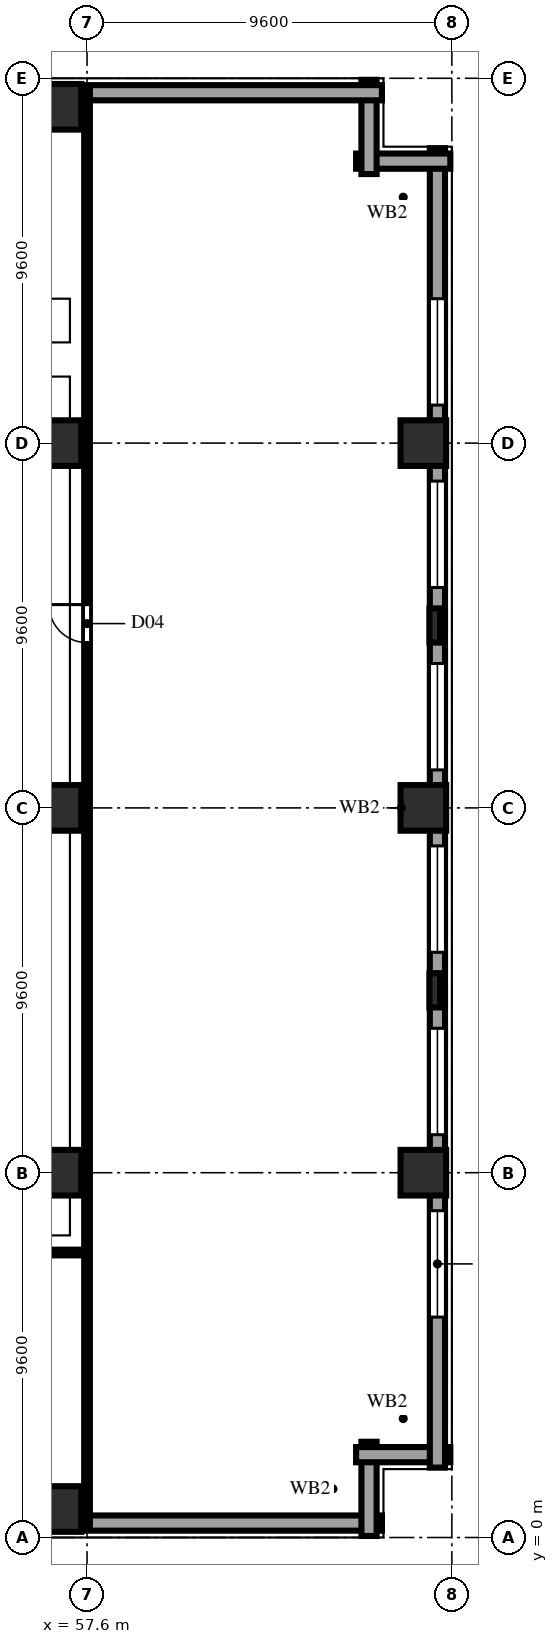
"""IFC4 building model, lengths in metres.
Left out: names, types, materials, properties, quantities, classifications, styles, units other than length and angle.
Written with IfcOpenShell. Run it as: python <this file> out.ifc"""

import sys

from ifc_helpers import new_model, si_unit, direction, frame, frame_2d, origin, origin_2d, place, context, subcontext, project, spatial, rectangle, extrude, element, fill, save


model = new_model("IFC4")
c1 = context("Model", 3, precision=1e-05, world=origin(), true_north=direction((0.0, 1.0)))
c2 = subcontext(c1, "Body", "Model", "MODEL_VIEW")
j1 = project(units=[si_unit("LENGTHUNIT", "METRE"), si_unit("PLANEANGLEUNIT", "RADIAN")], contexts=[c1])
p1 = place(None, origin())
s1 = spatial("IfcSite", under=j1, at=p1, CompositionType="ELEMENT")
p2 = place(p1, origin())
s2 = spatial("IfcBuilding", under=s1, at=p2, CompositionType="ELEMENT")
p3 = place(p2, frame((0.0, 0.0, 15.0)))
s3 = spatial("IfcBuildingStorey", under=s2, at=p3, CompositionType="ELEMENT", Elevation=15.0)
for number, where, z_axis, x_axis in (
    (1, (56.85, 0.75, 0.0), (0.0, 0.0, 1.0), (1.0, 0.0, 0.0)),
    (2, (56.85, 9.6, 0.0), (0.0, 0.0, 1.0), (1.0, 0.0, 0.0)),
    (3, (56.85, 19.2, 0.0), (0.0, 0.0, 1.0), (1.0, 0.0, 0.0)),
    (4, (56.85, 28.8, 0.0), (0.0, 0.0, 1.0), (1.0, 0.0, 0.0)),
    (5, (56.85, 37.65, 0.0), (0.0, 0.0, 1.0), (1.0, 0.0, 0.0)),
    (6, (66.45, 9.6, 0.0), (0.0, 0.0, 1.0), (1.0, 0.0, 0.0)),
    (7, (66.45, 19.2, 0.0), (0.0, 0.0, 1.0), (1.0, 0.0, 0.0)),
    (8, (66.45, 28.8, 0.0), (0.0, 0.0, 1.0), (1.0, 0.0, 0.0)),
):
    element("IfcColumn", number, at=place(p3, frame(where, z_axis=z_axis, x_axis=x_axis)), inside=s3, PredefinedType="COLUMN", context=c2, shape_type="SweptSolid", body=[
        extrude(rectangle(XDim=1.2, YDim=1.2, at=origin_2d()), origin(), (0.0, 0.0, 1.0), 4.6),
    ])
for number, where, z_axis, x_axis in (
    (9, (66.75, 14.4, 0.0), (0.0, 0.0, 1.0), (0.0, 1.0, 0.0)),
    (10, (66.75, 24.0, 0.0), (0.0, 0.0, 1.0), (0.0, 1.0, 0.0)),
):
    element("IfcColumn", number, at=place(p3, frame(where, z_axis=z_axis, x_axis=x_axis)), inside=s3, PredefinedType="PILASTER", context=c2, shape_type="SweptSolid", body=[
        extrude(rectangle(XDim=0.9, YDim=0.28, at=origin_2d()), origin(), (0.0, 0.0, 1.0), 4.6),
    ])
p4 = place(p3, frame((1.84, 0.38, 0.0), z_axis=(0.0, 0.0, 1.0), x_axis=(1.0, 0.0, 0.0)))
e11 = element("IfcWall", 11, at=p4, inside=s3, PredefinedType="SOLIDWALL", context=c2, shape_type="SweptSolid", body=[
    extrude(rectangle(XDim=63.52, YDim=0.4, at=frame_2d((31.76, 0.0))), origin(), (0.0, 0.0, 1.0), 4.26),
])
p5 = place(p4, frame((3.96, 0.0, 0.75)))
e12 = element("IfcOpeningElement", 12, at=p5, cuts=e11, PredefinedType="OPENING", context=c2, shape_type="SweptSolid", body=[
    extrude(rectangle(XDim=2.8, YDim=2.3, at=frame_2d((1.4, 1.15))), frame((0.0, 0.212, 0.0), z_axis=(0.0, -1.0, 0.0), x_axis=(1.0, 0.0, 0.0)), (0.0, 0.0, 1.0), 0.424),
])
p6 = place(p4, frame((8.76, 0.0, 0.75)))
e13 = element("IfcOpeningElement", 13, at=p6, cuts=e11, PredefinedType="OPENING", context=c2, shape_type="SweptSolid", body=[
    extrude(rectangle(XDim=2.8, YDim=2.3, at=frame_2d((1.4, 1.15))), frame((0.0, 0.212, 0.0), z_axis=(0.0, -1.0, 0.0), x_axis=(1.0, 0.0, 0.0)), (0.0, 0.0, 1.0), 0.424),
])
p7 = place(p4, frame((13.56, 0.0, 0.75)))
e14 = element("IfcOpeningElement", 14, at=p7, cuts=e11, PredefinedType="OPENING", context=c2, shape_type="SweptSolid", body=[
    extrude(rectangle(XDim=2.8, YDim=2.3, at=frame_2d((1.4, 1.15))), frame((0.0, 0.212, 0.0), z_axis=(0.0, -1.0, 0.0), x_axis=(1.0, 0.0, 0.0)), (0.0, 0.0, 1.0), 0.424),
])
p8 = place(p4, frame((18.36, 0.0, 0.75)))
e15 = element("IfcOpeningElement", 15, at=p8, cuts=e11, PredefinedType="OPENING", context=c2, shape_type="SweptSolid", body=[
    extrude(rectangle(XDim=2.8, YDim=2.3, at=frame_2d((1.4, 1.15))), frame((0.0, 0.212, 0.0), z_axis=(0.0, -1.0, 0.0), x_axis=(1.0, 0.0, 0.0)), (0.0, 0.0, 1.0), 0.424),
])
p9 = place(p4, frame((23.16, 0.0, 0.75)))
e16 = element("IfcOpeningElement", 16, at=p9, cuts=e11, PredefinedType="OPENING", context=c2, shape_type="SweptSolid", body=[
    extrude(rectangle(XDim=2.8, YDim=2.3, at=frame_2d((1.4, 1.15))), frame((0.0, 0.212, 0.0), z_axis=(0.0, -1.0, 0.0), x_axis=(1.0, 0.0, 0.0)), (0.0, 0.0, 1.0), 0.424),
])
p10 = place(p4, frame((27.96, 0.0, 0.75)))
e17 = element("IfcOpeningElement", 17, at=p10, cuts=e11, PredefinedType="OPENING", context=c2, shape_type="SweptSolid", body=[
    extrude(rectangle(XDim=2.8, YDim=2.3, at=frame_2d((1.4, 1.15))), frame((0.0, 0.212, 0.0), z_axis=(0.0, -1.0, 0.0), x_axis=(1.0, 0.0, 0.0)), (0.0, 0.0, 1.0), 0.424),
])
for number, where, z_axis, x_axis in (
    (18, (65.02, 0.04, 0.0), (0.0, 0.0, 1.0), (0.0, 1.0, 0.0)),
    (19, (64.68, 2.18, 0.0), (0.0, 0.0, 1.0), (1.0, 0.0, 0.0)),
):
    element("IfcWall", number, at=place(p3, frame(where, z_axis=z_axis, x_axis=x_axis)), inside=s3, PredefinedType="SOLIDWALL", context=c2, shape_type="SweptSolid", body=[
        extrude(rectangle(XDim=2.48, YDim=0.4, at=frame_2d((1.24, 0.0))), origin(), (0.0, 0.0, 1.0), 4.26),
    ])
p11 = place(p3, frame((66.82, 1.84, 0.0), z_axis=(0.0, 0.0, 1.0), x_axis=(0.0, 1.0, 0.0)))
e20 = element("IfcWall", 20, at=p11, inside=s3, PredefinedType="SOLIDWALL", context=c2, shape_type="SweptSolid", body=[
    extrude(rectangle(XDim=34.72, YDim=0.4, at=frame_2d((17.36, 0.0))), origin(), (0.0, 0.0, 1.0), 4.26),
])
p12 = place(p11, frame((3.96, 0.0, 0.75)))
e21 = element("IfcOpeningElement", 21, at=p12, cuts=e20, PredefinedType="OPENING", context=c2, shape_type="SweptSolid", body=[
    extrude(rectangle(XDim=2.8, YDim=2.3, at=frame_2d((1.4, 1.15))), frame((0.0, 0.212, 0.0), z_axis=(0.0, -1.0, 0.0), x_axis=(1.0, 0.0, 0.0)), (0.0, 0.0, 1.0), 0.424),
])
p13 = place(p11, frame((8.76, 0.0, 0.75)))
e22 = element("IfcOpeningElement", 22, at=p13, cuts=e20, PredefinedType="OPENING", context=c2, shape_type="SweptSolid", body=[
    extrude(rectangle(XDim=2.8, YDim=2.3, at=frame_2d((1.4, 1.15))), frame((0.0, 0.212, 0.0), z_axis=(0.0, -1.0, 0.0), x_axis=(1.0, 0.0, 0.0)), (0.0, 0.0, 1.0), 0.424),
])
p14 = place(p11, frame((13.56, 0.0, 0.75)))
e23 = element("IfcOpeningElement", 23, at=p14, cuts=e20, PredefinedType="OPENING", context=c2, shape_type="SweptSolid", body=[
    extrude(rectangle(XDim=2.8, YDim=2.3, at=frame_2d((1.4, 1.15))), frame((0.0, 0.212, 0.0), z_axis=(0.0, -1.0, 0.0), x_axis=(1.0, 0.0, 0.0)), (0.0, 0.0, 1.0), 0.424),
])
p15 = place(p11, frame((18.36, 0.0, 0.75)))
e24 = element("IfcOpeningElement", 24, at=p15, cuts=e20, PredefinedType="OPENING", context=c2, shape_type="SweptSolid", body=[
    extrude(rectangle(XDim=2.8, YDim=2.3, at=frame_2d((1.4, 1.15))), frame((0.0, 0.212, 0.0), z_axis=(0.0, -1.0, 0.0), x_axis=(1.0, 0.0, 0.0)), (0.0, 0.0, 1.0), 0.424),
])
p16 = place(p11, frame((23.16, 0.0, 0.75)))
e25 = element("IfcOpeningElement", 25, at=p16, cuts=e20, PredefinedType="OPENING", context=c2, shape_type="SweptSolid", body=[
    extrude(rectangle(XDim=2.8, YDim=2.3, at=frame_2d((1.4, 1.15))), frame((0.0, 0.212, 0.0), z_axis=(0.0, -1.0, 0.0), x_axis=(1.0, 0.0, 0.0)), (0.0, 0.0, 1.0), 0.424),
])
p17 = place(p11, frame((27.96, 0.0, 0.75)))
e26 = element("IfcOpeningElement", 26, at=p17, cuts=e20, PredefinedType="OPENING", context=c2, shape_type="SweptSolid", body=[
    extrude(rectangle(XDim=2.8, YDim=2.3, at=frame_2d((1.4, 1.15))), frame((0.0, 0.212, 0.0), z_axis=(0.0, -1.0, 0.0), x_axis=(1.0, 0.0, 0.0)), (0.0, 0.0, 1.0), 0.424),
])
p18 = place(p3, frame((67.16, 36.22, 0.0), z_axis=(0.0, 0.0, 1.0), x_axis=(-1.0, 0.0, 0.0)))
e27 = element("IfcWall", 27, at=p18, inside=s3, PredefinedType="SOLIDWALL", context=c2, shape_type="SweptSolid", body=[
    extrude(rectangle(XDim=2.48, YDim=0.4, at=frame_2d((1.24, 0.0))), origin(), (0.0, 0.0, 1.0), 4.26),
])
p19 = place(p3, frame((65.02, 35.88, 0.0), z_axis=(0.0, 0.0, 1.0), x_axis=(0.0, 1.0, 0.0)))
e28 = element("IfcWall", 28, at=p19, inside=s3, PredefinedType="SOLIDWALL", context=c2, shape_type="SweptSolid", body=[
    extrude(rectangle(XDim=2.48, YDim=0.4, at=frame_2d((1.24, 0.0))), origin(), (0.0, 0.0, 1.0), 4.26),
])
p20 = place(p3, frame((65.36, 38.02, 0.0), z_axis=(0.0, 0.0, 1.0), x_axis=(-1.0, 0.0, 0.0)))
e29 = element("IfcWall", 29, at=p20, inside=s3, PredefinedType="SOLIDWALL", context=c2, shape_type="SweptSolid", body=[
    extrude(rectangle(XDim=27.68, YDim=0.4, at=frame_2d((13.84, 0.0))), origin(), (0.0, 0.0, 1.0), 4.26),
])
p21 = place(p3, frame((0.22, 7.5, 0.0), z_axis=(0.0, 0.0, 1.0), x_axis=(1.0, 0.0, 0.0)))
e30 = element("IfcWall", 30, at=p21, inside=s3, PredefinedType="PARTITIONING", context=c2, shape_type="SweptSolid", body=[
    extrude(rectangle(XDim=57.38, YDim=0.15, at=frame_2d((28.69, 0.0))), origin(), (0.0, 0.0, 1.0), 4.26),
])
p22 = place(p21, frame((13.68, 0.0, 0.0)))
e31 = element("IfcOpeningElement", 31, at=p22, cuts=e30, PredefinedType="OPENING", context=c2, shape_type="SweptSolid", body=[
    extrude(rectangle(XDim=1.0, YDim=2.2, at=frame_2d((0.5, 1.1))), frame((0.0, 0.087, 0.0), z_axis=(0.0, -1.0, 0.0), x_axis=(1.0, 0.0, 0.0)), (0.0, 0.0, 1.0), 0.174),
])
p23 = place(p21, frame((23.28, 0.0, 0.0)))
e32 = element("IfcOpeningElement", 32, at=p23, cuts=e30, PredefinedType="OPENING", context=c2, shape_type="SweptSolid", body=[
    extrude(rectangle(XDim=1.0, YDim=2.2, at=frame_2d((0.5, 1.1))), frame((0.0, 0.087, 0.0), z_axis=(0.0, -1.0, 0.0), x_axis=(1.0, 0.0, 0.0)), (0.0, 0.0, 1.0), 0.174),
])
p24 = place(p21, frame((51.23, 0.0, 0.0)))
e33 = element("IfcOpeningElement", 33, at=p24, cuts=e30, PredefinedType="OPENING", context=c2, shape_type="SweptSolid", body=[
    extrude(rectangle(XDim=1.2, YDim=2.2, at=frame_2d((0.6, 1.1))), frame((0.0, 0.087, 0.0), z_axis=(0.0, -1.0, 0.0), x_axis=(1.0, 0.0, 0.0)), (0.0, 0.0, 1.0), 0.174),
])
p25 = place(p3, frame((57.6, 0.22, 0.0), z_axis=(0.0, 0.0, 1.0), x_axis=(0.0, 1.0, 0.0)))
e34 = element("IfcWall", 34, at=p25, inside=s3, PredefinedType="PARTITIONING", context=c2, shape_type="SweptSolid", body=[
    extrude(rectangle(XDim=37.96, YDim=0.15, at=frame_2d((18.98, 0.0))), origin(), (0.0, 0.0, 1.0), 4.26),
])
p26 = place(p25, frame((23.33, 0.0, 0.0)))
e35 = element("IfcOpeningElement", 35, at=p26, cuts=e34, PredefinedType="OPENING", context=c2, shape_type="SweptSolid", body=[
    extrude(rectangle(XDim=1.0, YDim=2.2, at=frame_2d((0.5, 1.1))), frame((0.0, 0.087, 0.0), z_axis=(0.0, -1.0, 0.0), x_axis=(1.0, 0.0, 0.0)), (0.0, 0.0, 1.0), 0.174),
])
p27 = place(p12, origin())
e36 = element("IfcWindow", 36, at=p27, inside=s3, PartitioningType="TRIPLE_PANEL_VERTICAL", PredefinedType="WINDOW", context=c2, shape_type="SweptSolid", body=[
    extrude(rectangle(XDim=2.8, YDim=2.3, at=frame_2d((1.4, 1.15))), frame((0.0, 0.11, 0.0), z_axis=(0.0, -1.0, 0.0), x_axis=(1.0, 0.0, 0.0)), (0.0, 0.0, 1.0), 0.06),
])
fill(e21, e36)
p28 = place(p13, origin())
e37 = element("IfcWindow", 37, at=p28, inside=s3, PartitioningType="TRIPLE_PANEL_VERTICAL", PredefinedType="WINDOW", context=c2, shape_type="SweptSolid", body=[
    extrude(rectangle(XDim=2.8, YDim=2.3, at=frame_2d((1.4, 1.15))), frame((0.0, 0.11, 0.0), z_axis=(0.0, -1.0, 0.0), x_axis=(1.0, 0.0, 0.0)), (0.0, 0.0, 1.0), 0.06),
])
fill(e22, e37)
p29 = place(p14, origin())
e38 = element("IfcWindow", 38, at=p29, inside=s3, PartitioningType="TRIPLE_PANEL_VERTICAL", PredefinedType="WINDOW", context=c2, shape_type="SweptSolid", body=[
    extrude(rectangle(XDim=2.8, YDim=2.3, at=frame_2d((1.4, 1.15))), frame((0.0, 0.11, 0.0), z_axis=(0.0, -1.0, 0.0), x_axis=(1.0, 0.0, 0.0)), (0.0, 0.0, 1.0), 0.06),
])
fill(e23, e38)
p30 = place(p15, origin())
e39 = element("IfcWindow", 39, at=p30, inside=s3, PartitioningType="TRIPLE_PANEL_VERTICAL", PredefinedType="WINDOW", context=c2, shape_type="SweptSolid", body=[
    extrude(rectangle(XDim=2.8, YDim=2.3, at=frame_2d((1.4, 1.15))), frame((0.0, 0.11, 0.0), z_axis=(0.0, -1.0, 0.0), x_axis=(1.0, 0.0, 0.0)), (0.0, 0.0, 1.0), 0.06),
])
fill(e24, e39)
p31 = place(p16, origin())
e40 = element("IfcWindow", 40, at=p31, inside=s3, PartitioningType="TRIPLE_PANEL_VERTICAL", PredefinedType="WINDOW", context=c2, shape_type="SweptSolid", body=[
    extrude(rectangle(XDim=2.8, YDim=2.3, at=frame_2d((1.4, 1.15))), frame((0.0, 0.11, 0.0), z_axis=(0.0, -1.0, 0.0), x_axis=(1.0, 0.0, 0.0)), (0.0, 0.0, 1.0), 0.06),
])
fill(e25, e40)
p32 = place(p17, origin())
e41 = element("IfcWindow", 41, at=p32, inside=s3, PartitioningType="TRIPLE_PANEL_VERTICAL", PredefinedType="WINDOW", context=c2, shape_type="SweptSolid", body=[
    extrude(rectangle(XDim=2.8, YDim=2.3, at=frame_2d((1.4, 1.15))), frame((0.0, 0.11, 0.0), z_axis=(0.0, -1.0, 0.0), x_axis=(1.0, 0.0, 0.0)), (0.0, 0.0, 1.0), 0.06),
])
fill(e26, e41)
p33 = place(p26, origin())
e42 = element("IfcDoor", 42, at=p33, inside=s3, OperationType="SINGLE_SWING_RIGHT", PredefinedType="DOOR", context=c2, shape_type="SweptSolid", body=[
    extrude(rectangle(XDim=1.0, YDim=2.2, at=frame_2d((0.5, 1.1))), frame((0.0, 0.025, 0.0), z_axis=(0.0, -1.0, 0.0), x_axis=(1.0, 0.0, 0.0)), (0.0, 0.0, 1.0), 0.05),
])
fill(e35, e42)
save(model, sys.argv[1])
